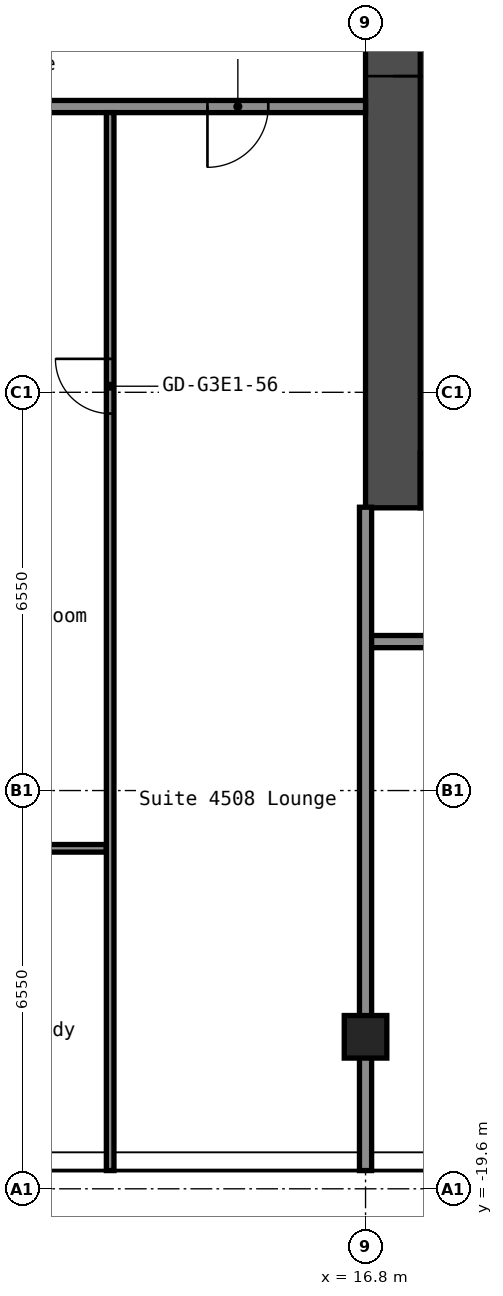
"""IFC4 building model, lengths in metres.
Left out: names, types, materials, properties, quantities, classifications, styles, units other than length and angle.
Written with IfcOpenShell. Run it as: python <this file> out.ifc"""

import sys

from ifc_helpers import new_model, si_unit, direction, frame, frame_2d, origin, origin_2d, place, context, subcontext, project, spatial, rectangle, hollow_rectangle, extrude, element, fill, save


model = new_model("IFC4")
c1 = context("Model", 3, precision=1e-05, world=origin(), true_north=direction((0.0, 1.0)))
c2 = subcontext(c1, "Body", "Model", "MODEL_VIEW")
j1 = project(units=[si_unit("LENGTHUNIT", "METRE"), si_unit("PLANEANGLEUNIT", "RADIAN")], contexts=[c1])
p1 = place(None, origin())
s1 = spatial("IfcSite", under=j1, at=p1, CompositionType="ELEMENT")
p2 = place(p1, origin())
s2 = spatial("IfcBuilding", under=s1, at=p2, CompositionType="ELEMENT")
p3 = place(p2, frame((0.0, 0.0, 159.8)))
s3 = spatial("IfcBuildingStorey", under=s2, at=p3, CompositionType="ELEMENT", Elevation=159.8)
p4 = place(p3, frame((16.8, -17.1, 0.0), z_axis=(0.0, 0.0, 1.0), x_axis=(1.0, 0.0, 0.0)))
e1 = element("IfcColumn", 1, at=p4, inside=s3, PredefinedType="COLUMN", context=c2, shape_type="SweptSolid", body=[
    extrude(hollow_rectangle(XDim=0.7, YDim=0.7, WallThickness=0.028, at=origin_2d()), origin(), (0.0, 0.0, 1.0), 2.75),
])
p5 = place(p3, frame((17.25, -8.4, 0.0), z_axis=(0.0, 0.0, 1.0), x_axis=(0.0, 1.0, 0.0)))
e2 = element("IfcWall", 2, at=p5, inside=s3, PredefinedType="SHEAR", context=c2, shape_type="SweptSolid", body=[
    extrude(rectangle(XDim=16.8, YDim=0.9, at=frame_2d((8.4, 0.0))), origin(), (0.0, 0.0, 1.0), 2.75),
])
p6 = place(p5, frame((7.1, 0.0, 0.0)))
e3 = element("IfcOpeningElement", 3, at=p6, cuts=e2, PredefinedType="OPENING", context=c2, shape_type="SweptSolid", body=[
    extrude(rectangle(XDim=1.6, YDim=2.1, at=frame_2d((0.8, 1.05))), frame((0.0, 0.46, 0.0), z_axis=(0.0, -1.0, 0.0), x_axis=(1.0, 0.0, 0.0)), (0.0, 0.0, 1.0), 0.92),
])
p7 = place(p3, frame((17.7, -7.95, 0.0), z_axis=(0.0, 0.0, 1.0), x_axis=(1.0, 0.0, 0.0)))
e4 = element("IfcWall", 4, at=p7, inside=s3, PredefinedType="SHEAR", context=c2, shape_type="SweptSolid", body=[
    extrude(rectangle(XDim=15.0, YDim=0.9, at=frame_2d((7.5, 0.0))), origin(), (0.0, 0.0, 1.0), 2.75),
])
p8 = place(p7, frame((2.55, 0.0, 0.0)))
e5 = element("IfcOpeningElement", 5, at=p8, cuts=e4, PredefinedType="OPENING", context=c2, shape_type="SweptSolid", body=[
    extrude(rectangle(XDim=1.0, YDim=2.1, at=frame_2d((0.5, 1.05))), frame((0.0, 0.46, 0.0), z_axis=(0.0, -1.0, 0.0), x_axis=(1.0, 0.0, 0.0)), (0.0, 0.0, 1.0), 0.92),
])
p9 = place(p3, frame((8.5, -14.0, 0.0), z_axis=(0.0, 0.0, 1.0), x_axis=(1.0, 0.0, 0.0)))
e6 = element("IfcWall", 6, at=p9, inside=s3, PredefinedType="PARTITIONING", context=c2, shape_type="SweptSolid", body=[
    extrude(rectangle(XDim=4.038, YDim=0.125, at=frame_2d((2.019, 0.0))), origin(), (0.0, 0.0, 1.0), 2.75),
])
p10 = place(p9, frame((1.55, 0.0, 0.0)))
e7 = element("IfcOpeningElement", 7, at=p10, cuts=e6, PredefinedType="OPENING", context=c2, shape_type="SweptSolid", body=[
    extrude(rectangle(XDim=0.9, YDim=2.1, at=frame_2d((0.45, 1.05))), frame((0.0, 0.073, 0.0), z_axis=(0.0, -1.0, 0.0), x_axis=(1.0, 0.0, 0.0)), (0.0, 0.0, 1.0), 0.145),
])
p11 = place(p3, frame((16.8, -10.6, 0.0), z_axis=(0.0, 0.0, 1.0), x_axis=(1.0, 0.0, 0.0)))
e8 = element("IfcWall", 8, at=p11, inside=s3, PredefinedType="PARTITIONING", context=c2, shape_type="SweptSolid", body=[
    extrude(rectangle(XDim=25.9, YDim=0.2, at=frame_2d((12.95, 0.0))), origin(), (0.0, 0.0, 1.0), 2.75),
])
p12 = place(p11, frame((3.4, 0.0, 0.0)))
e9 = element("IfcOpeningElement", 9, at=p12, cuts=e8, PredefinedType="OPENING", context=c2, shape_type="SweptSolid", body=[
    extrude(rectangle(XDim=1.6, YDim=2.1, at=frame_2d((0.8, 1.05))), frame((0.0, 0.11, 0.0), z_axis=(0.0, -1.0, 0.0), x_axis=(1.0, 0.0, 0.0)), (0.0, 0.0, 1.0), 0.22),
])
p13 = place(p11, frame((11.8, 0.0, 0.0)))
e10 = element("IfcOpeningElement", 10, at=p13, cuts=e8, PredefinedType="OPENING", context=c2, shape_type="SweptSolid", body=[
    extrude(rectangle(XDim=1.6, YDim=2.1, at=frame_2d((0.8, 1.05))), frame((0.0, 0.11, 0.0), z_axis=(0.0, -1.0, 0.0), x_axis=(1.0, 0.0, 0.0)), (0.0, 0.0, 1.0), 0.22),
])
p14 = place(p11, frame((20.4, 0.0, 0.0)))
e11 = element("IfcOpeningElement", 11, at=p14, cuts=e8, PredefinedType="OPENING", context=c2, shape_type="SweptSolid", body=[
    extrude(rectangle(XDim=1.6, YDim=2.1, at=frame_2d((0.8, 1.05))), frame((0.0, 0.11, 0.0), z_axis=(0.0, -1.0, 0.0), x_axis=(1.0, 0.0, 0.0)), (0.0, 0.0, 1.0), 0.22),
])
p15 = place(p3, frame((-16.8, -1.8, 0.0), z_axis=(0.0, 0.0, 1.0), x_axis=(1.0, 0.0, 0.0)))
e12 = element("IfcWall", 12, at=p15, inside=s3, PredefinedType="PARTITIONING", context=c2, shape_type="SweptSolid", body=[
    extrude(rectangle(XDim=33.6, YDim=0.2, at=frame_2d((16.8, 0.0))), origin(), (0.0, 0.0, 1.0), 2.75),
])
p16 = place(p15, frame((1.6, 0.0, 0.0)))
e13 = element("IfcOpeningElement", 13, at=p16, cuts=e12, PredefinedType="OPENING", context=c2, shape_type="SweptSolid", body=[
    extrude(rectangle(XDim=1.0, YDim=2.1, at=frame_2d((0.5, 1.05))), frame((0.0, 0.11, 0.0), z_axis=(0.0, -1.0, 0.0), x_axis=(1.0, 0.0, 0.0)), (0.0, 0.0, 1.0), 0.22),
])
p17 = place(p15, frame((14.2, 0.0, 0.0)))
e14 = element("IfcOpeningElement", 14, at=p17, cuts=e12, PredefinedType="OPENING", context=c2, shape_type="SweptSolid", body=[
    extrude(rectangle(XDim=1.0, YDim=2.1, at=frame_2d((0.5, 1.05))), frame((0.0, 0.11, 0.0), z_axis=(0.0, -1.0, 0.0), x_axis=(1.0, 0.0, 0.0)), (0.0, 0.0, 1.0), 0.22),
])
p18 = place(p15, frame((22.6, 0.0, 0.0)))
e15 = element("IfcOpeningElement", 15, at=p18, cuts=e12, PredefinedType="OPENING", context=c2, shape_type="SweptSolid", body=[
    extrude(rectangle(XDim=1.0, YDim=2.1, at=frame_2d((0.5, 1.05))), frame((0.0, 0.11, 0.0), z_axis=(0.0, -1.0, 0.0), x_axis=(1.0, 0.0, 0.0)), (0.0, 0.0, 1.0), 0.22),
])
p19 = place(p15, frame((31.0, 0.0, 0.0)))
e16 = element("IfcOpeningElement", 16, at=p19, cuts=e12, PredefinedType="OPENING", context=c2, shape_type="SweptSolid", body=[
    extrude(rectangle(XDim=1.0, YDim=2.1, at=frame_2d((0.5, 1.05))), frame((0.0, 0.11, 0.0), z_axis=(0.0, -1.0, 0.0), x_axis=(1.0, 0.0, 0.0)), (0.0, 0.0, 1.0), 0.22),
])
p20 = place(p3, frame((12.6, -19.3, 0.0), z_axis=(0.0, 0.0, 1.0), x_axis=(0.0, 1.0, 0.0)))
e17 = element("IfcWall", 17, at=p20, inside=s3, PredefinedType="PARTITIONING", context=c2, shape_type="SweptSolid", body=[
    extrude(rectangle(XDim=17.4, YDim=0.125, at=frame_2d((8.7, 0.0))), origin(), (0.0, 0.0, 1.0), 2.75),
])
p21 = place(p20, frame((12.45, 0.0, 0.0)))
e18 = element("IfcOpeningElement", 18, at=p21, cuts=e17, PredefinedType="OPENING", context=c2, shape_type="SweptSolid", body=[
    extrude(rectangle(XDim=0.9, YDim=2.1, at=frame_2d((0.45, 1.05))), frame((0.0, 0.073, 0.0), z_axis=(0.0, -1.0, 0.0), x_axis=(1.0, 0.0, 0.0)), (0.0, 0.0, 1.0), 0.145),
])
p22 = place(p3, frame((16.8, -19.3, 0.0), z_axis=(0.0, 0.0, 1.0), x_axis=(0.0, 1.0, 0.0)))
e19 = element("IfcWall", 19, at=p22, inside=s3, PredefinedType="PARTITIONING", context=c2, shape_type="SweptSolid", body=[
    extrude(rectangle(XDim=10.91, YDim=0.2, at=frame_2d((5.455, 0.0))), origin(), (0.0, 0.0, 1.0), 2.75),
])
p23 = place(p6, origin())
e20 = element("IfcDoor", 20, at=p23, inside=s3, OperationType="DOUBLE_DOOR_SINGLE_SWING", PredefinedType="DOOR", context=c2, shape_type="SweptSolid", body=[
    extrude(rectangle(XDim=1.6, YDim=2.1, at=frame_2d((0.8, 1.05))), frame((0.0, 0.025, 0.0), z_axis=(0.0, -1.0, 0.0), x_axis=(1.0, 0.0, 0.0)), (0.0, 0.0, 1.0), 0.05),
])
fill(e3, e20)
p24 = place(p19, origin())
e21 = element("IfcDoor", 21, at=p24, inside=s3, OperationType="SINGLE_SWING_LEFT", PredefinedType="DOOR", context=c2, shape_type="SweptSolid", body=[
    extrude(rectangle(XDim=1.0, YDim=2.1, at=frame_2d((0.5, 1.05))), frame((0.0, 0.025, 0.0), z_axis=(0.0, -1.0, 0.0), x_axis=(1.0, 0.0, 0.0)), (0.0, 0.0, 1.0), 0.05),
])
fill(e16, e21)
p25 = place(p21, origin())
e22 = element("IfcDoor", 22, at=p25, inside=s3, OperationType="SINGLE_SWING_LEFT", PredefinedType="DOOR", context=c2, shape_type="SweptSolid", body=[
    extrude(rectangle(XDim=0.9, YDim=2.1, at=frame_2d((0.45, 1.05))), frame((0.0, 0.025, 0.0), z_axis=(0.0, -1.0, 0.0), x_axis=(1.0, 0.0, 0.0)), (0.0, 0.0, 1.0), 0.05),
])
fill(e18, e22)
save(model, sys.argv[1])
